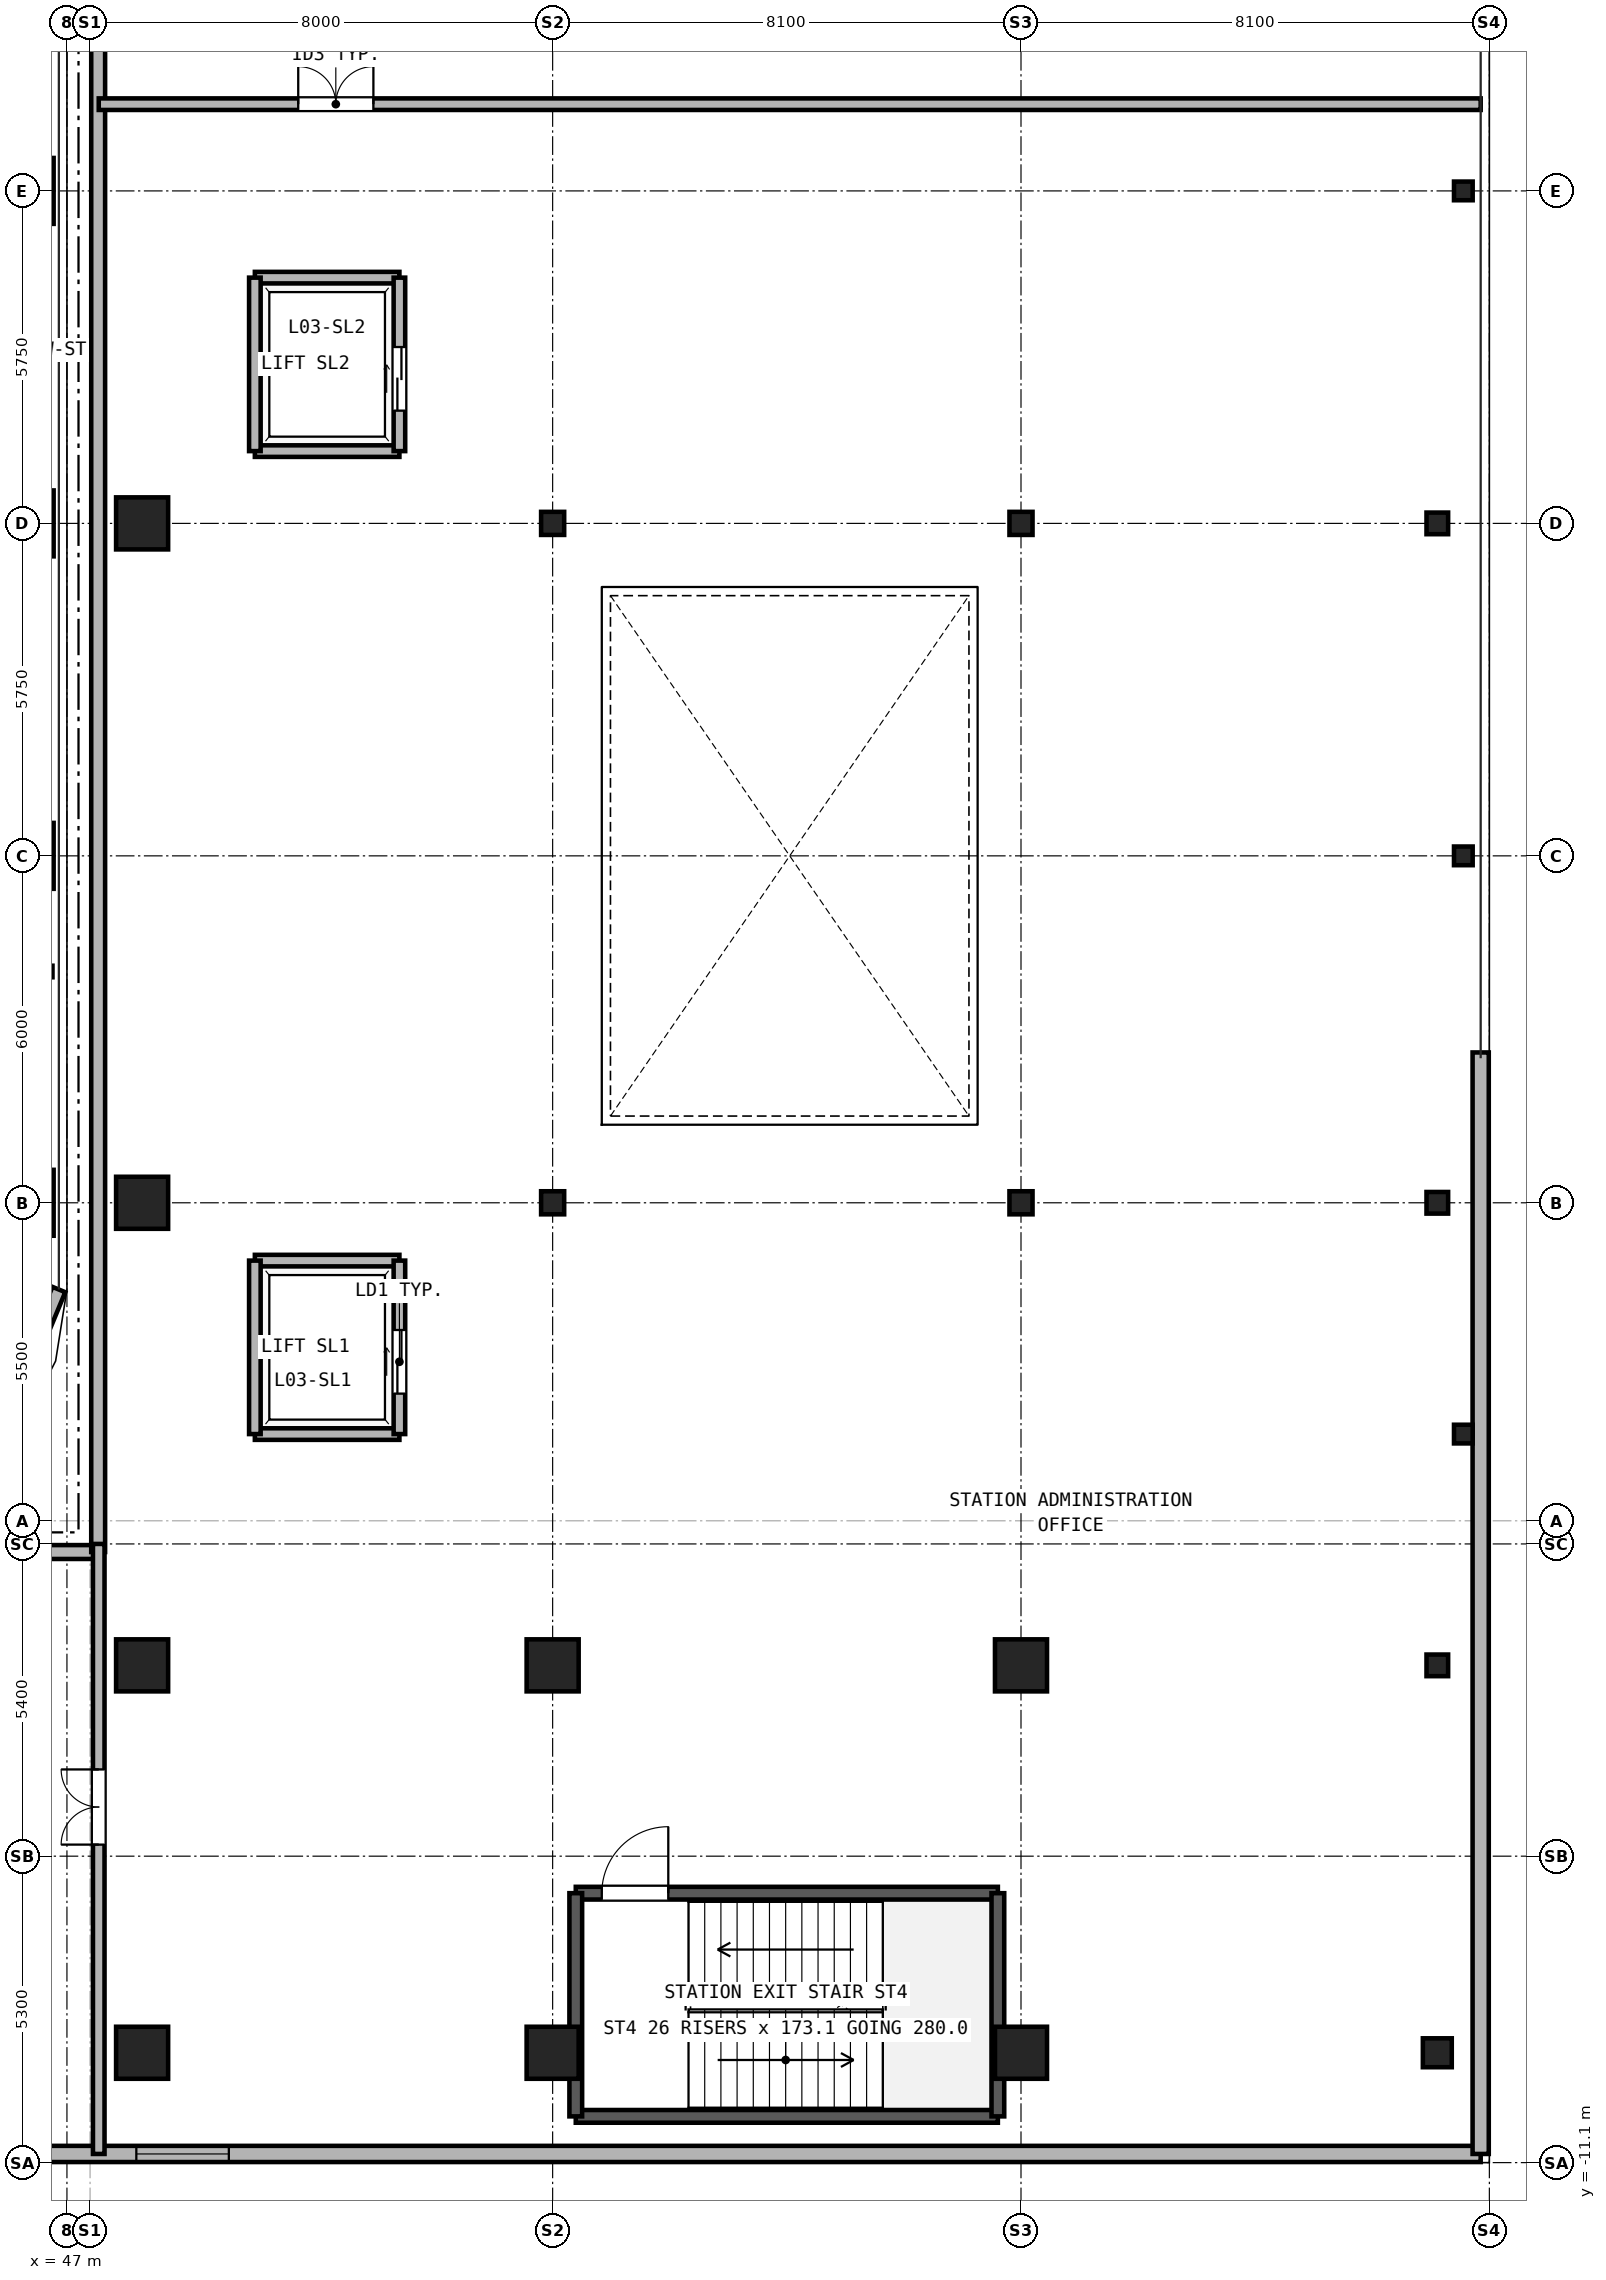
"""IFC4 building model, lengths in metres.
Left out: names, types, materials, properties, quantities, classifications, styles, units other than length and angle.
Written with IfcOpenShell. Run it as: python <this file> out.ifc"""

import sys

from ifc_helpers import new_model, si_unit, direction, frame, frame_2d, origin, origin_2d, place, context, subcontext, project, spatial, rectangle, hollow_rectangle, i_section, extrude, source, transform, mapped, element, fill, save


model = new_model("IFC4")
c1 = context("Model", 3, precision=1e-05, world=origin(), true_north=direction((0.0, 1.0)))
c2 = subcontext(c1, "Body", "Model", "MODEL_VIEW")
j1 = project(units=[si_unit("LENGTHUNIT", "METRE"), si_unit("PLANEANGLEUNIT", "RADIAN")], contexts=[c1])
p1 = place(None, origin())
s1 = spatial("IfcSite", under=j1, at=p1, CompositionType="ELEMENT")
p2 = place(p1, origin())
s2 = spatial("IfcBuilding", under=s1, at=p2, CompositionType="ELEMENT")
p3 = place(p2, frame((0.0, 0.0, 13.5)))
s3 = spatial("IfcBuildingStorey", under=s2, at=p3, CompositionType="ELEMENT", Elevation=13.5)
m1 = source(origin(), c2, "Body", "SweptSolid", [
    extrude(hollow_rectangle(XDim=1.14, YDim=1.14, WallThickness=0.07, at=origin_2d()), origin(), (0.0, 0.0, 1.0), 4.18),
])
for number, where, z_axis, x_axis in (
    (1, (46.2, 5.5, 0.0), (0.0, 0.0, 1.0), (1.0, 0.0, 0.0)),
    (2, (46.2, 11.5, 0.0), (0.0, 0.0, 1.0), (1.0, 0.0, 0.0)),
    (3, (46.2, 17.25, 0.0), (0.0, 0.0, 1.0), (1.0, 0.0, 0.0)),
    (4, (46.2, 23.0, 0.0), (0.0, 0.0, 1.0), (1.0, 0.0, 0.0)),
):
    element("IfcColumn", number, at=place(p3, frame(where, z_axis=z_axis, x_axis=x_axis)), inside=s3, PredefinedType="COLUMN", context=c2, shape_type="MappedRepresentation", body=[
        mapped(m1, transform((0.0, 0.0, 0.0), x_axis=(1.0, 0.0, 0.0), y_axis=(0.0, 1.0, 0.0), z_axis=(0.0, 0.0, 1.0), scale=1.0)),
    ])
m2 = source(origin(), c2, "Body", "SweptSolid", [
    extrude(hollow_rectangle(XDim=0.7, YDim=0.9, WallThickness=0.04, at=origin_2d()), origin(), (0.0, 0.0, 1.0), 4.18),
])
for number, where, z_axis, x_axis in (
    (5, (48.3, -9.2, 0.0), (0.0, 0.0, 1.0), (1.0, 0.0, 0.0)),
    (6, (48.3, -2.5, 0.0), (0.0, 0.0, 1.0), (1.0, 0.0, 0.0)),
    (7, (48.3, 5.5, 0.0), (0.0, 0.0, 1.0), (1.0, 0.0, 0.0)),
    (8, (48.3, 17.25, 0.0), (0.0, 0.0, 1.0), (1.0, 0.0, 0.0)),
    (9, (55.4, -9.2, 0.0), (0.0, 0.0, 1.0), (1.0, 0.0, 0.0)),
    (10, (55.4, -2.5, 0.0), (0.0, 0.0, 1.0), (1.0, 0.0, 0.0)),
):
    element("IfcColumn", number, at=place(p3, frame(where, z_axis=z_axis, x_axis=x_axis)), inside=s3, PredefinedType="COLUMN", context=c2, shape_type="MappedRepresentation", body=[
        mapped(m2, transform((0.0, 0.0, 0.0), x_axis=(1.0, 0.0, 0.0), y_axis=(0.0, 1.0, 0.0), z_axis=(0.0, 0.0, 1.0), scale=1.0)),
    ])
m3 = source(origin(), c2, "Body", "SweptSolid", [
    extrude(i_section(OverallWidth=0.399, OverallDepth=0.393, WebThickness=0.023, FlangeThickness=0.037, at=origin_2d()), origin(), (0.0, 0.0, 1.0), 4.18),
])
for number, where, z_axis, x_axis in (
    (11, (55.4, 5.5, 0.0), (0.0, 0.0, 1.0), (1.0, 0.0, 0.0)),
    (12, (55.4, 17.25, 0.0), (0.0, 0.0, 1.0), (1.0, 0.0, 0.0)),
):
    element("IfcColumn", number, at=place(p3, frame(where, z_axis=z_axis, x_axis=x_axis)), inside=s3, PredefinedType="COLUMN", context=c2, shape_type="MappedRepresentation", body=[
        mapped(m3, transform((0.0, 0.0, 0.0), x_axis=(1.0, 0.0, 0.0), y_axis=(0.0, 1.0, 0.0), z_axis=(0.0, 0.0, 1.0), scale=1.0)),
    ])
for number, where, z_axis, x_axis in (
    (13, (63.5, -9.2, 0.0), (0.0, 0.0, 1.0), (1.0, 0.0, 0.0)),
    (14, (63.5, -2.5, 0.0), (0.0, 0.0, 1.0), (1.0, 0.0, 0.0)),
):
    element("IfcColumn", number, at=place(p3, frame(where, z_axis=z_axis, x_axis=x_axis)), inside=s3, PredefinedType="COLUMN", context=c2, shape_type="MappedRepresentation", body=[
        mapped(m2, transform((0.0, 0.0, 0.0), x_axis=(1.0, 0.0, 0.0), y_axis=(0.0, 1.0, 0.0), z_axis=(0.0, 0.0, 1.0), scale=1.0)),
    ])
for number, where, z_axis, x_axis in (
    (15, (63.5, 5.5, 0.0), (0.0, 0.0, 1.0), (1.0, 0.0, 0.0)),
    (16, (63.5, 17.25, 0.0), (0.0, 0.0, 1.0), (1.0, 0.0, 0.0)),
):
    element("IfcColumn", number, at=place(p3, frame(where, z_axis=z_axis, x_axis=x_axis)), inside=s3, PredefinedType="COLUMN", context=c2, shape_type="MappedRepresentation", body=[
        mapped(m3, transform((0.0, 0.0, 0.0), x_axis=(1.0, 0.0, 0.0), y_axis=(0.0, 1.0, 0.0), z_axis=(0.0, 0.0, 1.0), scale=1.0)),
    ])
m4 = source(origin(), c2, "Body", "SweptSolid", [
    extrude(hollow_rectangle(XDim=0.5, YDim=0.5, WallThickness=0.025, at=origin_2d()), origin(), (0.0, 0.0, 1.0), 4.18),
])
p4 = place(p3, frame((70.7, -9.2, 0.0), z_axis=(0.0, 0.0, 1.0), x_axis=(1.0, 0.0, 0.0)))
e17 = element("IfcColumn", 17, at=p4, inside=s3, PredefinedType="COLUMN", context=c2, shape_type="MappedRepresentation", body=[
    mapped(m4, transform((0.0, 0.0, 0.0), x_axis=(1.0, 0.0, 0.0), y_axis=(0.0, 1.0, 0.0), z_axis=(0.0, 0.0, 1.0), scale=1.0)),
])
m5 = source(origin(), c2, "Body", "SweptSolid", [
    extrude(i_section(OverallWidth=0.374, OverallDepth=0.372, WebThickness=0.016, FlangeThickness=0.026, at=origin_2d()), origin(), (0.0, 0.0, 1.0), 4.18),
])
for number, where, z_axis, x_axis in (
    (18, (70.7, -2.5, 0.0), (0.0, 0.0, 1.0), (1.0, 0.0, 0.0)),
    (19, (70.7, 5.5, 0.0), (0.0, 0.0, 1.0), (1.0, 0.0, 0.0)),
    (20, (70.7, 17.25, 0.0), (0.0, 0.0, 1.0), (1.0, 0.0, 0.0)),
):
    element("IfcColumn", number, at=place(p3, frame(where, z_axis=z_axis, x_axis=x_axis)), inside=s3, PredefinedType="COLUMN", context=c2, shape_type="MappedRepresentation", body=[
        mapped(m5, transform((0.0, 0.0, 0.0), x_axis=(1.0, 0.0, 0.0), y_axis=(0.0, 1.0, 0.0), z_axis=(0.0, 0.0, 1.0), scale=1.0)),
    ])
m6 = source(origin(), c2, "Body", "SweptSolid", [
    extrude(i_section(OverallWidth=0.309, OverallDepth=0.323, WebThickness=0.014, FlangeThickness=0.023, at=origin_2d()), origin(), (0.0, 0.0, 1.0), 4.18),
])
for number, where, z_axis, x_axis in (
    (21, (71.15, 1.5, 0.0), (0.0, 0.0, 1.0), (1.0, 0.0, 0.0)),
    (22, (71.15, 11.5, 0.0), (0.0, 0.0, 1.0), (1.0, 0.0, 0.0)),
    (23, (71.15, 23.0, 0.0), (0.0, 0.0, 1.0), (1.0, 0.0, 0.0)),
):
    element("IfcColumn", number, at=place(p3, frame(where, z_axis=z_axis, x_axis=x_axis)), inside=s3, PredefinedType="PILASTER", context=c2, shape_type="MappedRepresentation", body=[
        mapped(m6, transform((0.0, 0.0, 0.0), x_axis=(1.0, 0.0, 0.0), y_axis=(0.0, 1.0, 0.0), z_axis=(0.0, 0.0, 1.0), scale=1.0)),
    ])
p5 = place(p3, frame((45.729, 1.271, 0.0), z_axis=(0.0, 0.0, 1.0), x_axis=(0.382689947836, 0.923876833688, 0.0)))
e24 = element("IfcWall", 24, at=p5, inside=s3, PredefinedType="SOLIDWALL", context=c2, shape_type="SweptSolid", body=[
    extrude(rectangle(XDim=2.954, YDim=0.24, at=frame_2d((1.477, 0.0))), origin(), (0.0, 0.0, 1.0), 4.18),
])
p6 = place(p3, frame((41.9, -10.95, 0.0), z_axis=(0.0, 0.0, 1.0), x_axis=(1.0, 0.0, 0.0)))
e25 = element("IfcWall", 25, at=p6, inside=s3, PredefinedType="SOLIDWALL", context=c2, shape_type="SweptSolid", body=[
    extrude(rectangle(XDim=29.55, YDim=0.28, at=frame_2d((14.775, 0.0))), origin(), (0.0, 0.0, 1.0), 4.18),
])
p7 = place(p6, frame((6.3, 0.0, 1.1)))
e26 = element("IfcOpeningElement", 26, at=p7, cuts=e25, PredefinedType="OPENING", context=c2, shape_type="SweptSolid", body=[
    extrude(rectangle(XDim=1.6, YDim=1.4, at=frame_2d((0.8, 0.7))), frame((0.0, 0.15, 0.0), z_axis=(0.0, -1.0, 0.0), x_axis=(1.0, 0.0, 0.0)), (0.0, 0.0, 1.0), 0.3),
])
p8 = place(p3, frame((71.45, -10.95, 0.0), z_axis=(0.0, 0.0, 1.0), x_axis=(0.0, 1.0, 0.0)))
e27 = element("IfcWall", 27, at=p8, inside=s3, PredefinedType="SOLIDWALL", context=c2, shape_type="SweptSolid", body=[
    extrude(rectangle(XDim=19.05, YDim=0.28, at=frame_2d((9.525, 0.0))), origin(), (0.0, 0.0, 1.0), 4.18),
])
p9 = place(p3, frame((0.2, -0.54, 0.0), z_axis=(0.0, 0.0, 1.0), x_axis=(1.0, 0.0, 0.0)))
e28 = element("IfcWall", 28, at=p9, inside=s3, PredefinedType="SOLIDWALL", context=c2, shape_type="SweptSolid", body=[
    extrude(rectangle(XDim=47.34, YDim=0.24, at=frame_2d((23.67, 0.0))), origin(), (0.0, 0.0, 1.0), 4.18),
])
p10 = place(p3, frame((47.54, -0.54, 0.0), z_axis=(0.0, 0.0, 1.0), x_axis=(0.0, 1.0, 0.0)))
e29 = element("IfcWall", 29, at=p10, inside=s3, PredefinedType="SOLIDWALL", context=c2, shape_type="SweptSolid", body=[
    extrude(rectangle(XDim=40.89, YDim=0.24, at=frame_2d((20.445, 0.0))), origin(), (0.0, 0.0, 1.0), 4.18),
])
p11 = place(p3, frame((55.8, -10.3, 0.0), z_axis=(0.0, 0.0, 1.0), x_axis=(1.0, 0.0, 0.0)))
e30 = element("IfcWall", 30, at=p11, inside=s3, PredefinedType="SOLIDWALL", context=c2, shape_type="SweptSolid", body=[
    extrude(rectangle(XDim=7.3, YDim=0.22, at=frame_2d((3.65, 0.0))), origin(), (0.0, 0.0, 1.0), 4.18),
])
p12 = place(p3, frame((55.8, -6.44, 0.0), z_axis=(0.0, 0.0, 1.0), x_axis=(1.0, 0.0, 0.0)))
e31 = element("IfcWall", 31, at=p12, inside=s3, PredefinedType="SOLIDWALL", context=c2, shape_type="SweptSolid", body=[
    extrude(rectangle(XDim=7.3, YDim=0.22, at=frame_2d((3.65, 0.0))), origin(), (0.0, 0.0, 1.0), 4.18),
])
p13 = place(p12, frame((0.45, 0.0, 0.0)))
e32 = element("IfcOpeningElement", 32, at=p13, cuts=e31, PredefinedType="OPENING", context=c2, shape_type="SweptSolid", body=[
    extrude(rectangle(XDim=1.15, YDim=2.2, at=frame_2d((0.575, 1.1))), frame((0.0, 0.12, 0.0), z_axis=(0.0, -1.0, 0.0), x_axis=(1.0, 0.0, 0.0)), (0.0, 0.0, 1.0), 0.24),
])
for number, where, z_axis, x_axis in (
    (33, (55.8, -10.3, 0.0), (0.0, 0.0, 1.0), (0.0, 1.0, 0.0)),
    (34, (63.1, -10.3, 0.0), (0.0, 0.0, 1.0), (0.0, 1.0, 0.0)),
):
    element("IfcWall", number, at=place(p3, frame(where, z_axis=z_axis, x_axis=x_axis)), inside=s3, PredefinedType="SOLIDWALL", context=c2, shape_type="SweptSolid", body=[
        extrude(rectangle(XDim=3.86, YDim=0.22, at=frame_2d((1.93, 0.0))), origin(), (0.0, 0.0, 1.0), 4.18),
    ])
for number, where, z_axis, x_axis in (
    (35, (50.25, 1.5, 0.0), (0.0, 0.0, 1.0), (1.0, 0.0, 0.0)),
    (36, (50.25, 4.5, 0.0), (0.0, 0.0, 1.0), (1.0, 0.0, 0.0)),
):
    element("IfcWall", number, at=place(p3, frame(where, z_axis=z_axis, x_axis=x_axis)), inside=s3, PredefinedType="PARTITIONING", context=c2, shape_type="SweptSolid", body=[
        extrude(rectangle(XDim=2.5, YDim=0.2, at=frame_2d((1.25, 0.0))), origin(), (0.0, 0.0, 1.0), 4.18),
    ])
p14 = place(p3, frame((50.25, 1.5, 0.0), z_axis=(0.0, 0.0, 1.0), x_axis=(0.0, 1.0, 0.0)))
e37 = element("IfcWall", 37, at=p14, inside=s3, PredefinedType="PARTITIONING", context=c2, shape_type="SweptSolid", body=[
    extrude(rectangle(XDim=3.0, YDim=0.2, at=frame_2d((1.5, 0.0))), origin(), (0.0, 0.0, 1.0), 4.18),
])
p15 = place(p3, frame((52.75, 1.5, 0.0), z_axis=(0.0, 0.0, 1.0), x_axis=(0.0, 1.0, 0.0)))
e38 = element("IfcWall", 38, at=p15, inside=s3, PredefinedType="PARTITIONING", context=c2, shape_type="SweptSolid", body=[
    extrude(rectangle(XDim=3.0, YDim=0.2, at=frame_2d((1.5, 0.0))), origin(), (0.0, 0.0, 1.0), 4.18),
])
p16 = place(p15, frame((0.7, 0.0, 0.0)))
e39 = element("IfcOpeningElement", 39, at=p16, cuts=e38, PredefinedType="OPENING", context=c2, shape_type="SweptSolid", body=[
    extrude(rectangle(XDim=1.1, YDim=2.25, at=frame_2d((0.55, 1.125))), frame((0.0, 0.11, 0.0), z_axis=(0.0, -1.0, 0.0), x_axis=(1.0, 0.0, 0.0)), (0.0, 0.0, 1.0), 0.22),
])
for number, where, z_axis, x_axis in (
    (40, (50.25, 18.5, 0.0), (0.0, 0.0, 1.0), (1.0, 0.0, 0.0)),
    (41, (50.25, 21.5, 0.0), (0.0, 0.0, 1.0), (1.0, 0.0, 0.0)),
):
    element("IfcWall", number, at=place(p3, frame(where, z_axis=z_axis, x_axis=x_axis)), inside=s3, PredefinedType="PARTITIONING", context=c2, shape_type="SweptSolid", body=[
        extrude(rectangle(XDim=2.5, YDim=0.2, at=frame_2d((1.25, 0.0))), origin(), (0.0, 0.0, 1.0), 4.18),
    ])
p17 = place(p3, frame((50.25, 18.5, 0.0), z_axis=(0.0, 0.0, 1.0), x_axis=(0.0, 1.0, 0.0)))
e42 = element("IfcWall", 42, at=p17, inside=s3, PredefinedType="PARTITIONING", context=c2, shape_type="SweptSolid", body=[
    extrude(rectangle(XDim=3.0, YDim=0.2, at=frame_2d((1.5, 0.0))), origin(), (0.0, 0.0, 1.0), 4.18),
])
p18 = place(p3, frame((52.75, 18.5, 0.0), z_axis=(0.0, 0.0, 1.0), x_axis=(0.0, 1.0, 0.0)))
e43 = element("IfcWall", 43, at=p18, inside=s3, PredefinedType="PARTITIONING", context=c2, shape_type="SweptSolid", body=[
    extrude(rectangle(XDim=3.0, YDim=0.2, at=frame_2d((1.5, 0.0))), origin(), (0.0, 0.0, 1.0), 4.18),
])
p19 = place(p18, frame((0.7, 0.0, 0.0)))
e44 = element("IfcOpeningElement", 44, at=p19, cuts=e43, PredefinedType="OPENING", context=c2, shape_type="SweptSolid", body=[
    extrude(rectangle(XDim=1.1, YDim=2.25, at=frame_2d((0.55, 1.125))), frame((0.0, 0.11, 0.0), z_axis=(0.0, -1.0, 0.0), x_axis=(1.0, 0.0, 0.0)), (0.0, 0.0, 1.0), 0.22),
])
p20 = place(p3, frame((47.55, 24.5, 0.0), z_axis=(0.0, 0.0, 1.0), x_axis=(1.0, 0.0, 0.0)))
e45 = element("IfcWall", 45, at=p20, inside=s3, PredefinedType="PARTITIONING", context=c2, shape_type="SweptSolid", body=[
    extrude(rectangle(XDim=23.9, YDim=0.2, at=frame_2d((11.95, 0.0))), origin(), (0.0, 0.0, 1.0), 4.18),
])
p21 = place(p20, frame((3.45, 0.0, 0.0)))
e46 = element("IfcOpeningElement", 46, at=p21, cuts=e45, PredefinedType="OPENING", context=c2, shape_type="SweptSolid", body=[
    extrude(rectangle(XDim=1.3, YDim=2.2, at=frame_2d((0.65, 1.1))), frame((0.0, 0.11, 0.0), z_axis=(0.0, -1.0, 0.0), x_axis=(1.0, 0.0, 0.0)), (0.0, 0.0, 1.0), 0.22),
])
p22 = place(p3, frame((47.55, -10.95, 0.0), z_axis=(0.0, 0.0, 1.0), x_axis=(0.0, 1.0, 0.0)))
e47 = element("IfcWall", 47, at=p22, inside=s3, PredefinedType="PARTITIONING", context=c2, shape_type="SweptSolid", body=[
    extrude(rectangle(XDim=10.55, YDim=0.2, at=frame_2d((5.275, 0.0))), origin(), (0.0, 0.0, 1.0), 4.18),
])
p23 = place(p22, frame((5.35, 0.0, 0.0)))
e48 = element("IfcOpeningElement", 48, at=p23, cuts=e47, PredefinedType="OPENING", context=c2, shape_type="SweptSolid", body=[
    extrude(rectangle(XDim=1.3, YDim=2.2, at=frame_2d((0.65, 1.1))), frame((0.0, 0.11, 0.0), z_axis=(0.0, -1.0, 0.0), x_axis=(1.0, 0.0, 0.0)), (0.0, 0.0, 1.0), 0.22),
])
p24 = place(p7, origin())
e49 = element("IfcWindow", 49, at=p24, inside=s3, PartitioningType="SINGLE_PANEL", PredefinedType="WINDOW", context=c2, shape_type="SweptSolid", body=[
    extrude(rectangle(XDim=1.6, YDim=1.4, at=frame_2d((0.8, 0.7))), frame((0.0, 0.03, 0.0), z_axis=(0.0, -1.0, 0.0), x_axis=(1.0, 0.0, 0.0)), (0.0, 0.0, 1.0), 0.06),
])
fill(e26, e49)
p25 = place(p13, origin())
e50 = element("IfcDoor", 50, at=p25, inside=s3, OperationType="SINGLE_SWING_RIGHT", PredefinedType="DOOR", context=c2, shape_type="SweptSolid", body=[
    extrude(rectangle(XDim=1.15, YDim=2.2, at=frame_2d((0.575, 1.1))), frame((0.0, 0.025, 0.0), z_axis=(0.0, -1.0, 0.0), x_axis=(1.0, 0.0, 0.0)), (0.0, 0.0, 1.0), 0.05),
])
fill(e32, e50)
p26 = place(p16, origin())
e51 = element("IfcDoor", 51, at=p26, inside=s3, OperationType="DOUBLE_DOOR_SLIDING", PredefinedType="DOOR", context=c2, shape_type="SweptSolid", body=[
    extrude(rectangle(XDim=1.1, YDim=2.25, at=frame_2d((0.55, 1.125))), frame((0.0, 0.025, 0.0), z_axis=(0.0, -1.0, 0.0), x_axis=(1.0, 0.0, 0.0)), (0.0, 0.0, 1.0), 0.05),
])
fill(e39, e51)
p27 = place(p19, origin())
e52 = element("IfcDoor", 52, at=p27, inside=s3, OperationType="DOUBLE_DOOR_SLIDING", PredefinedType="DOOR", context=c2, shape_type="SweptSolid", body=[
    extrude(rectangle(XDim=1.1, YDim=2.25, at=frame_2d((0.55, 1.125))), frame((0.0, 0.025, 0.0), z_axis=(0.0, -1.0, 0.0), x_axis=(1.0, 0.0, 0.0)), (0.0, 0.0, 1.0), 0.05),
])
fill(e44, e52)
p28 = place(p21, origin())
e53 = element("IfcDoor", 53, at=p28, inside=s3, OperationType="DOUBLE_DOOR_SINGLE_SWING", PredefinedType="DOOR", context=c2, shape_type="SweptSolid", body=[
    extrude(rectangle(XDim=1.3, YDim=2.2, at=frame_2d((0.65, 1.1))), frame((0.0, 0.025, 0.0), z_axis=(0.0, -1.0, 0.0), x_axis=(1.0, 0.0, 0.0)), (0.0, 0.0, 1.0), 0.05),
])
fill(e46, e53)
p29 = place(p23, origin())
e54 = element("IfcDoor", 54, at=p29, inside=s3, OperationType="DOUBLE_DOOR_SINGLE_SWING", PredefinedType="DOOR", context=c2, shape_type="SweptSolid", body=[
    extrude(rectangle(XDim=1.3, YDim=2.2, at=frame_2d((0.65, 1.1))), frame((0.0, 0.025, 0.0), z_axis=(0.0, -1.0, 0.0), x_axis=(1.0, 0.0, 0.0)), (0.0, 0.0, 1.0), 0.05),
])
fill(e48, e54)
save(model, sys.argv[1])
